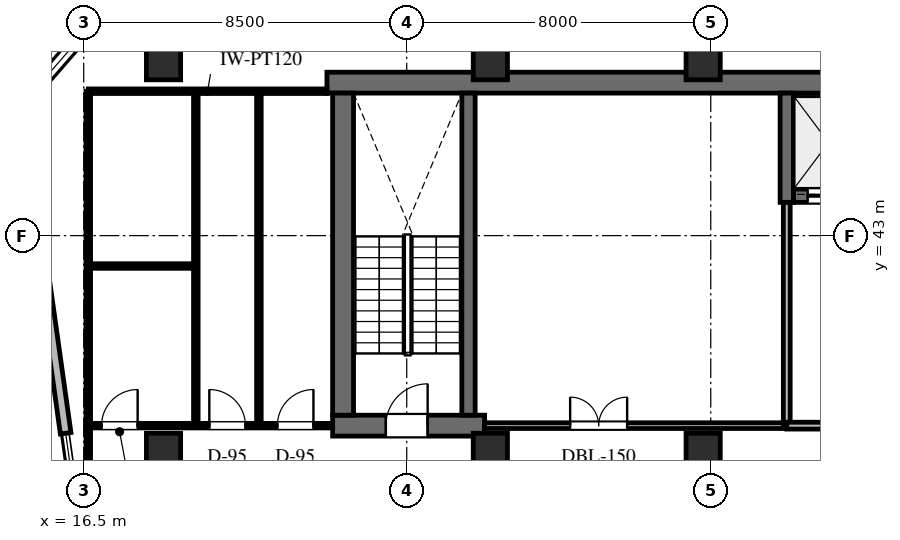
"""IFC4 building model, lengths in metres.
Left out: names, types, materials, properties, quantities, classifications, styles, units other than length and angle.
Written with IfcOpenShell. Run it as: python <this file> out.ifc"""

import sys

from ifc_helpers import new_model, si_unit, direction, frame, frame_2d, origin, origin_2d, place, context, subcontext, project, spatial, rectangle, extrude, element, fill, save


model = new_model("IFC4")
c1 = context("Model", 3, precision=1e-05, world=origin(), true_north=direction((0.0, 1.0)))
c2 = subcontext(c1, "Body", "Model", "MODEL_VIEW")
j1 = project(units=[si_unit("LENGTHUNIT", "METRE"), si_unit("PLANEANGLEUNIT", "RADIAN")], contexts=[c1])
p1 = place(None, origin())
s1 = spatial("IfcSite", under=j1, at=p1, CompositionType="ELEMENT")
p2 = place(p1, origin())
s2 = spatial("IfcBuilding", under=s1, at=p2, CompositionType="ELEMENT")
p3 = place(p2, frame((0.0, 0.0, 212.5)))
s3 = spatial("IfcBuildingStorey", under=s2, at=p3, CompositionType="ELEMENT", Elevation=212.5)
p4 = place(p3, frame((22.9, 47.025, 0.0), z_axis=(0.0, 0.0, 1.0), x_axis=(1.0, 0.0, 0.0)))
e1 = element("IfcWall", 1, at=p4, inside=s3, PredefinedType="SHEAR", context=c2, shape_type="SweptSolid", body=[
    extrude(rectangle(XDim=43.5, YDim=0.55, at=frame_2d((21.75, 0.0))), origin(), (0.0, 0.0, 1.0), 4.0),
])
p5 = place(p3, frame((35.175, 44.05, 0.0), z_axis=(0.0, 0.0, 1.0), x_axis=(1.0, 0.0, 0.0)))
e2 = element("IfcWall", 2, at=p5, inside=s3, PredefinedType="SHEAR", context=c2, shape_type="SweptSolid", body=[
    extrude(rectangle(XDim=9.7, YDim=0.35, at=frame_2d((4.85, 0.0))), origin(), (0.0, 0.0, 1.0), 4.0),
])
p6 = place(p5, frame((0.375, 0.0, 0.0)))
e3 = element("IfcOpeningElement", 3, at=p6, cuts=e2, PredefinedType="OPENING", context=c2, shape_type="SweptSolid", body=[
    extrude(rectangle(XDim=1.1, YDim=2.2, at=frame_2d((0.55, 1.1))), frame((0.0, 0.185, 0.0), z_axis=(0.0, -1.0, 0.0), x_axis=(1.0, 0.0, 0.0)), (0.0, 0.0, 1.0), 0.37),
])
p7 = place(p5, frame((2.375, 0.0, 0.0)))
e4 = element("IfcOpeningElement", 4, at=p7, cuts=e2, PredefinedType="OPENING", context=c2, shape_type="SweptSolid", body=[
    extrude(rectangle(XDim=1.1, YDim=2.2, at=frame_2d((0.55, 1.1))), frame((0.0, 0.185, 0.0), z_axis=(0.0, -1.0, 0.0), x_axis=(1.0, 0.0, 0.0)), (0.0, 0.0, 1.0), 0.37),
])
p8 = place(p5, frame((4.375, 0.0, 0.0)))
e5 = element("IfcOpeningElement", 5, at=p8, cuts=e2, PredefinedType="OPENING", context=c2, shape_type="SweptSolid", body=[
    extrude(rectangle(XDim=1.1, YDim=2.2, at=frame_2d((0.55, 1.1))), frame((0.0, 0.185, 0.0), z_axis=(0.0, -1.0, 0.0), x_axis=(1.0, 0.0, 0.0)), (0.0, 0.0, 1.0), 0.37),
])
p9 = place(p5, frame((6.375, 0.0, 0.0)))
e6 = element("IfcOpeningElement", 6, at=p9, cuts=e2, PredefinedType="OPENING", context=c2, shape_type="SweptSolid", body=[
    extrude(rectangle(XDim=1.1, YDim=2.2, at=frame_2d((0.55, 1.1))), frame((0.0, 0.185, 0.0), z_axis=(0.0, -1.0, 0.0), x_axis=(1.0, 0.0, 0.0)), (0.0, 0.0, 1.0), 0.37),
])
p10 = place(p3, frame((35.0, 43.875, 0.0), z_axis=(0.0, 0.0, 1.0), x_axis=(0.0, 1.0, 0.0)))
e7 = element("IfcWall", 7, at=p10, inside=s3, PredefinedType="SHEAR", context=c2, shape_type="SweptSolid", body=[
    extrude(rectangle(XDim=2.875, YDim=0.35, at=frame_2d((1.438, 0.0))), origin(), (0.0, 0.0, 1.0), 4.0),
])
p11 = place(p3, frame((23.05, 38.0, 0.0), z_axis=(0.0, 0.0, 1.0), x_axis=(1.0, 0.0, 0.0)))
e8 = element("IfcWall", 8, at=p11, inside=s3, PredefinedType="SHEAR", context=c2, shape_type="SweptSolid", body=[
    extrude(rectangle(XDim=4.0, YDim=0.55, at=frame_2d((2.0, 0.0))), origin(), (0.0, 0.0, 1.0), 4.0),
])
p12 = place(p11, frame((1.4, 0.0, 0.0)))
e9 = element("IfcOpeningElement", 9, at=p12, cuts=e8, PredefinedType="OPENING", context=c2, shape_type="SweptSolid", body=[
    extrude(rectangle(XDim=1.1, YDim=2.2, at=frame_2d((0.55, 1.1))), frame((0.0, 0.285, 0.0), z_axis=(0.0, -1.0, 0.0), x_axis=(1.0, 0.0, 0.0)), (0.0, 0.0, 1.0), 0.57),
])
p13 = place(p3, frame((23.325, 38.275, 0.0), z_axis=(0.0, 0.0, 1.0), x_axis=(0.0, 1.0, 0.0)))
e10 = element("IfcWall", 10, at=p13, inside=s3, PredefinedType="SHEAR", context=c2, shape_type="SweptSolid", body=[
    extrude(rectangle(XDim=8.475, YDim=0.55, at=frame_2d((4.238, 0.0))), origin(), (0.0, 0.0, 1.0), 4.0),
])
p14 = place(p3, frame((26.625, 38.275, 0.0), z_axis=(0.0, 0.0, 1.0), x_axis=(0.0, 1.0, 0.0)))
e11 = element("IfcWall", 11, at=p14, inside=s3, PredefinedType="SHEAR", context=c2, shape_type="SweptSolid", body=[
    extrude(rectangle(XDim=8.475, YDim=0.35, at=frame_2d((4.238, 0.0))), origin(), (0.0, 0.0, 1.0), 4.0),
])
for number, where, z_axis, x_axis in (
    (12, (32.8, 37.35, 0.0), (0.0, 0.0, 1.0), (1.0, 0.0, 0.0)),
    (13, (32.8, 47.55, 0.0), (0.0, 0.0, 1.0), (1.0, 0.0, 0.0)),
    (14, (27.2, 37.35, 0.0), (0.0, 0.0, 1.0), (1.0, 0.0, 0.0)),
    (15, (27.2, 47.55, 0.0), (0.0, 0.0, 1.0), (1.0, 0.0, 0.0)),
    (16, (18.6, 37.35, 0.0), (0.0, 0.0, 1.0), (1.0, 0.0, 0.0)),
    (17, (18.6, 47.55, 0.0), (0.0, 0.0, 1.0), (1.0, 0.0, 0.0)),
):
    element("IfcColumn", number, at=place(p3, frame(where, z_axis=z_axis, x_axis=x_axis)), inside=s3, PredefinedType="COLUMN", context=c2, shape_type="SweptSolid", body=[
        extrude(rectangle(XDim=0.9, YDim=0.9, at=origin_2d()), origin(), (0.0, 0.0, 1.0), 4.0),
    ])
p15 = place(p3, frame((16.025, 37.8, 0.0), z_axis=(0.0, 0.0, 1.0), x_axis=(-0.13918102754, 0.990266954701, 0.0)))
e18 = element("IfcWall", 18, at=p15, inside=s3, PredefinedType="STANDARD", context=c2, shape_type="SweptSolid", body=[
    extrude(rectangle(XDim=8.667, YDim=0.28, at=frame_2d((4.333, 0.0))), origin(), (0.0, 0.0, 1.0), 3.755),
])
p16 = place(p15, frame((3.374, 0.0, 0.65)))
e19 = element("IfcOpeningElement", 19, at=p16, cuts=e18, PredefinedType="OPENING", context=c2, shape_type="SweptSolid", body=[
    extrude(rectangle(XDim=1.8, YDim=2.1, at=frame_2d((0.9, 1.05))), frame((0.0, 0.15, 0.0), z_axis=(0.0, -1.0, 0.0), x_axis=(1.0, 0.0, 0.0)), (0.0, 0.0, 1.0), 0.3),
])
p17 = place(p3, frame((14.819, 46.383, 0.0), z_axis=(0.0, 0.0, 1.0), x_axis=(0.656071351282, 0.754698868442, 0.0)))
e20 = element("IfcWall", 20, at=p17, inside=s3, PredefinedType="STANDARD", context=c2, shape_type="SweptSolid", body=[
    extrude(rectangle(XDim=2.646, YDim=0.28, at=frame_2d((1.323, 0.0))), origin(), (0.0, 0.0, 1.0), 3.755),
])
p18 = place(p17, frame((0.416, 0.0, 0.65)))
e21 = element("IfcOpeningElement", 21, at=p18, cuts=e20, PredefinedType="OPENING", context=c2, shape_type="SweptSolid", body=[
    extrude(rectangle(XDim=1.8, YDim=2.1, at=frame_2d((0.9, 1.05))), frame((0.0, 0.15, 0.0), z_axis=(0.0, -1.0, 0.0), x_axis=(1.0, 0.0, 0.0)), (0.0, 0.0, 1.0), 0.3),
])
p19 = place(p3, frame((27.05, 38.0, 0.0), z_axis=(0.0, 0.0, 1.0), x_axis=(1.0, 0.0, 0.0)))
e22 = element("IfcWall", 22, at=p19, inside=s3, PredefinedType="PARTITIONING", context=c2, shape_type="SweptSolid", body=[
    extrude(rectangle(XDim=7.95, YDim=0.15, at=frame_2d((3.975, 0.0))), origin(), (0.0, 0.0, 1.0), 2.982),
])
p20 = place(p19, frame((2.25, 0.0, 0.0)))
e23 = element("IfcOpeningElement", 23, at=p20, cuts=e22, PredefinedType="OPENING", context=c2, shape_type="SweptSolid", body=[
    extrude(rectangle(XDim=1.5, YDim=2.2, at=frame_2d((0.75, 1.1))), frame((0.0, 0.085, 0.0), z_axis=(0.0, -1.0, 0.0), x_axis=(1.0, 0.0, 0.0)), (0.0, 0.0, 1.0), 0.17),
])
p21 = place(p3, frame((35.0, 38.0, 0.0), z_axis=(0.0, 0.0, 1.0), x_axis=(0.0, 1.0, 0.0)))
e24 = element("IfcWall", 24, at=p21, inside=s3, PredefinedType="STANDARD", context=c2, shape_type="SweptSolid", body=[
    extrude(rectangle(XDim=5.875, YDim=0.18, at=frame_2d((2.938, 0.0))), origin(), (0.0, 0.0, 1.0), 3.755),
])
p22 = place(p3, frame((35.0, 38.0, 0.0), z_axis=(0.0, 0.0, 1.0), x_axis=(1.0, 0.0, 0.0)))
e25 = element("IfcWall", 25, at=p22, inside=s3, PredefinedType="STANDARD", context=c2, shape_type="SweptSolid", body=[
    extrude(rectangle(XDim=10.05, YDim=0.18, at=frame_2d((5.025, 0.0))), origin(), (0.0, 0.0, 1.0), 2.982),
])
p23 = place(p22, frame((5.858, 0.0, 0.0)))
e26 = element("IfcOpeningElement", 26, at=p23, cuts=e25, PredefinedType="OPENING", context=c2, shape_type="SweptSolid", body=[
    extrude(rectangle(XDim=1.8, YDim=2.2, at=frame_2d((0.9, 1.1))), frame((0.0, 0.1, 0.0), z_axis=(0.0, -1.0, 0.0), x_axis=(1.0, 0.0, 0.0)), (0.0, 0.0, 1.0), 0.2),
])
p24 = place(p3, frame((16.62, 38.0, 0.0), z_axis=(0.0, 0.0, 1.0), x_axis=(1.0, 0.0, 0.0)))
e27 = element("IfcWall", 27, at=p24, inside=s3, PredefinedType="PARTITIONING", context=c2, shape_type="SweptSolid", body=[
    extrude(rectangle(XDim=6.43, YDim=0.12, at=frame_2d((3.215, 0.0))), origin(), (0.0, 0.0, 1.0), 2.982),
])
p25 = place(p24, frame((0.349, 0.0, 0.0)))
e28 = element("IfcOpeningElement", 28, at=p25, cuts=e27, PredefinedType="OPENING", context=c2, shape_type="SweptSolid", body=[
    extrude(rectangle(XDim=0.95, YDim=2.15, at=frame_2d((0.475, 1.075))), frame((0.0, 0.07, 0.0), z_axis=(0.0, -1.0, 0.0), x_axis=(1.0, 0.0, 0.0)), (0.0, 0.0, 1.0), 0.14),
])
p26 = place(p24, frame((3.185, 0.0, 0.0)))
e29 = element("IfcOpeningElement", 29, at=p26, cuts=e27, PredefinedType="OPENING", context=c2, shape_type="SweptSolid", body=[
    extrude(rectangle(XDim=0.95, YDim=2.15, at=frame_2d((0.475, 1.075))), frame((0.0, 0.07, 0.0), z_axis=(0.0, -1.0, 0.0), x_axis=(1.0, 0.0, 0.0)), (0.0, 0.0, 1.0), 0.14),
])
p27 = place(p24, frame((4.975, 0.0, 0.0)))
e30 = element("IfcOpeningElement", 30, at=p27, cuts=e27, PredefinedType="OPENING", context=c2, shape_type="SweptSolid", body=[
    extrude(rectangle(XDim=0.95, YDim=2.15, at=frame_2d((0.475, 1.075))), frame((0.0, 0.07, 0.0), z_axis=(0.0, -1.0, 0.0), x_axis=(1.0, 0.0, 0.0)), (0.0, 0.0, 1.0), 0.14),
])
p28 = place(p3, frame((16.62, 38.0, 0.0), z_axis=(0.0, 0.0, 1.0), x_axis=(0.0, 1.0, 0.0)))
e31 = element("IfcWall", 31, at=p28, inside=s3, PredefinedType="PARTITIONING", context=c2, shape_type="SweptSolid", body=[
    extrude(rectangle(XDim=8.8, YDim=0.12, at=frame_2d((4.4, 0.0))), origin(), (0.0, 0.0, 1.0), 3.755),
])
p29 = place(p3, frame((16.62, 46.8, 0.0), z_axis=(0.0, 0.0, 1.0), x_axis=(1.0, 0.0, 0.0)))
e32 = element("IfcWall", 32, at=p29, inside=s3, PredefinedType="PARTITIONING", context=c2, shape_type="SweptSolid", body=[
    extrude(rectangle(XDim=6.28, YDim=0.12, at=frame_2d((3.14, 0.0))), origin(), (0.0, 0.0, 1.0), 2.982),
])
for number, where, z_axis, x_axis in (
    (33, (19.45, 38.068, 0.0), (0.0, 0.0, 1.0), (0.0, 1.0, 0.0)),
    (34, (21.11, 38.068, 0.0), (0.0, 0.0, 1.0), (0.0, 1.0, 0.0)),
):
    element("IfcWall", number, at=place(p3, frame(where, z_axis=z_axis, x_axis=x_axis)), inside=s3, PredefinedType="PARTITIONING", context=c2, shape_type="SweptSolid", body=[
        extrude(rectangle(XDim=8.664, YDim=0.12, at=frame_2d((4.332, 0.0))), origin(), (0.0, 0.0, 1.0), 3.755),
    ])
p30 = place(p3, frame((16.688, 42.2, 0.0), z_axis=(0.0, 0.0, 1.0), x_axis=(1.0, 0.0, 0.0)))
e35 = element("IfcWall", 35, at=p30, inside=s3, PredefinedType="PARTITIONING", context=c2, shape_type="SweptSolid", body=[
    extrude(rectangle(XDim=2.694, YDim=0.12, at=frame_2d((1.347, 0.0))), origin(), (0.0, 0.0, 1.0), 2.982),
])
p31 = place(p3, frame((16.62, 34.4, 0.0), z_axis=(0.0, 0.0, 1.0), x_axis=(0.0, 1.0, 0.0)))
e36 = element("IfcWall", 36, at=p31, inside=s3, PredefinedType="PARTITIONING", context=c2, shape_type="SweptSolid", body=[
    extrude(rectangle(XDim=3.65, YDim=0.12, at=frame_2d((1.825, 0.0))), origin(), (0.0, 0.0, 1.0), 3.755),
])
p32 = place(p18, origin())
e37 = element("IfcWindow", 37, at=p32, inside=s3, PartitioningType="SINGLE_PANEL", PredefinedType="WINDOW", context=c2, shape_type="SweptSolid", body=[
    extrude(rectangle(XDim=1.8, YDim=2.1, at=frame_2d((0.9, 1.05))), frame((0.0, 0.03, 0.0), z_axis=(0.0, -1.0, 0.0), x_axis=(1.0, 0.0, 0.0)), (0.0, 0.0, 1.0), 0.06),
])
fill(e21, e37)
p33 = place(p12, origin())
e38 = element("IfcDoor", 38, at=p33, inside=s3, OperationType="SINGLE_SWING_RIGHT", PredefinedType="DOOR", context=c2, shape_type="SweptSolid", body=[
    extrude(rectangle(XDim=1.1, YDim=2.2, at=frame_2d((0.55, 1.1))), frame((0.0, 0.025, 0.0), z_axis=(0.0, -1.0, 0.0), x_axis=(1.0, 0.0, 0.0)), (0.0, 0.0, 1.0), 0.05),
])
fill(e9, e38)
p34 = place(p6, origin())
e39 = element("IfcDoor", 39, at=p34, inside=s3, OperationType="DOUBLE_DOOR_SLIDING", PredefinedType="DOOR", context=c2, shape_type="SweptSolid", body=[
    extrude(rectangle(XDim=1.1, YDim=2.2, at=frame_2d((0.55, 1.1))), frame((0.0, 0.025, 0.0), z_axis=(0.0, -1.0, 0.0), x_axis=(1.0, 0.0, 0.0)), (0.0, 0.0, 1.0), 0.05),
])
fill(e3, e39)
p35 = place(p20, origin())
e40 = element("IfcDoor", 40, at=p35, inside=s3, OperationType="DOUBLE_DOOR_SINGLE_SWING", PredefinedType="DOOR", context=c2, shape_type="SweptSolid", body=[
    extrude(rectangle(XDim=1.5, YDim=2.2, at=frame_2d((0.75, 1.1))), frame((0.0, 0.025, 0.0), z_axis=(0.0, -1.0, 0.0), x_axis=(1.0, 0.0, 0.0)), (0.0, 0.0, 1.0), 0.05),
])
fill(e23, e40)
p36 = place(p25, origin())
e41 = element("IfcDoor", 41, at=p36, inside=s3, OperationType="SINGLE_SWING_RIGHT", PredefinedType="DOOR", context=c2, shape_type="SweptSolid", body=[
    extrude(rectangle(XDim=0.95, YDim=2.15, at=frame_2d((0.475, 1.075))), frame((0.0, 0.025, 0.0), z_axis=(0.0, -1.0, 0.0), x_axis=(1.0, 0.0, 0.0)), (0.0, 0.0, 1.0), 0.05),
])
fill(e28, e41)
p37 = place(p26, origin())
e42 = element("IfcDoor", 42, at=p37, inside=s3, OperationType="SINGLE_SWING_LEFT", PredefinedType="DOOR", context=c2, shape_type="SweptSolid", body=[
    extrude(rectangle(XDim=0.95, YDim=2.15, at=frame_2d((0.475, 1.075))), frame((0.0, 0.025, 0.0), z_axis=(0.0, -1.0, 0.0), x_axis=(1.0, 0.0, 0.0)), (0.0, 0.0, 1.0), 0.05),
])
fill(e29, e42)
p38 = place(p27, origin())
e43 = element("IfcDoor", 43, at=p38, inside=s3, OperationType="SINGLE_SWING_RIGHT", PredefinedType="DOOR", context=c2, shape_type="SweptSolid", body=[
    extrude(rectangle(XDim=0.95, YDim=2.15, at=frame_2d((0.475, 1.075))), frame((0.0, 0.025, 0.0), z_axis=(0.0, -1.0, 0.0), x_axis=(1.0, 0.0, 0.0)), (0.0, 0.0, 1.0), 0.05),
])
fill(e30, e43)
save(model, sys.argv[1])
